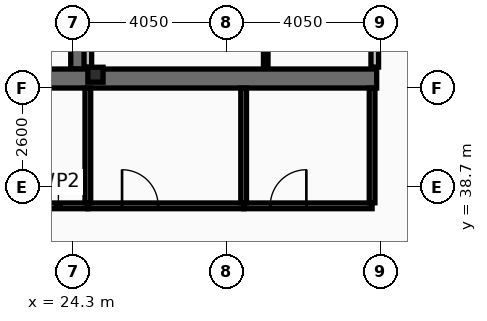
"""IFC4 building model, lengths in metres.
Left out: names, types, materials, properties, quantities, classifications, styles, units other than length and angle.
Written with IfcOpenShell. Run it as: python <this file> out.ifc"""

import sys

from ifc_helpers import new_model, si_unit, direction, frame, frame_2d, origin, origin_2d, place, context, subcontext, project, spatial, rectangle, i_section, extrude, element, fill, save


model = new_model("IFC4")
c1 = context("Model", 3, precision=1e-05, world=origin(), true_north=direction((0.0, 1.0)))
c2 = subcontext(c1, "Body", "Model", "MODEL_VIEW")
j1 = project(units=[si_unit("LENGTHUNIT", "METRE"), si_unit("PLANEANGLEUNIT", "RADIAN")], contexts=[c1])
p1 = place(None, origin())
s1 = spatial("IfcSite", under=j1, at=p1, CompositionType="ELEMENT")
p2 = place(p1, origin())
s2 = spatial("IfcBuilding", under=s1, at=p2, CompositionType="ELEMENT")
p3 = place(p2, frame((0.0, 0.0, 295.0)))
s3 = spatial("IfcBuildingStorey", under=s2, at=p3, CompositionType="ELEMENT", Elevation=295.0)
p4 = place(p3, frame((24.45, 41.8, 0.0), z_axis=(0.0, 0.0, 1.0), x_axis=(0.0, 1.0, 0.0)))
e1 = element("IfcWall", 1, at=p4, inside=s3, PredefinedType="SHEAR", context=c2, shape_type="SweptSolid", body=[
    extrude(rectangle(XDim=11.4, YDim=0.4, at=frame_2d((5.7, 0.0))), origin(), (0.0, 0.0, 1.0), 3.44),
])
p5 = place(p3, frame((32.3, 41.55, 0.0), z_axis=(0.0, 0.0, 1.0), x_axis=(-1.0, 0.0, 0.0)))
e2 = element("IfcWall", 2, at=p5, inside=s3, PredefinedType="SHEAR", context=c2, shape_type="SweptSolid", body=[
    extrude(rectangle(XDim=11.45, YDim=0.5, at=frame_2d((5.725, 0.0))), origin(), (0.0, 0.0, 1.0), 3.44),
])
p6 = place(p3, frame((24.9, 41.65, 0.0), z_axis=(0.0, 0.0, 1.0), x_axis=(1.0, 0.0, 0.0)))
e3 = element("IfcColumn", 3, at=p6, inside=s3, PredefinedType="COLUMN", context=c2, shape_type="SweptSolid", body=[
    extrude(i_section(OverallWidth=0.399, OverallDepth=0.393, WebThickness=0.023, FlangeThickness=0.037, at=origin_2d()), origin(), (0.0, 0.0, 1.0), 3.6),
])
for number, where, z_axis, x_axis in (
    (4, (24.7, 41.85, 0.0), (0.0, 0.0, 1.0), (0.0, 1.0, 0.0)),
    (5, (32.25, 41.85, 0.0), (0.0, 0.0, 1.0), (0.0, 1.0, 0.0)),
):
    element("IfcWall", number, at=place(p3, frame(where, z_axis=z_axis, x_axis=x_axis)), inside=s3, PredefinedType="PARTITIONING", context=c2, shape_type="SweptSolid", body=[
        extrude(rectangle(XDim=2.395, YDim=0.2, at=frame_2d((1.198, 0.0))), origin(), (0.0, 0.0, 1.0), 3.44),
    ])
p7 = place(p3, frame((29.381, 41.85, 0.0), z_axis=(0.0, 0.0, 1.0), x_axis=(0.0, 1.0, 0.0)))
e6 = element("IfcWall", 6, at=p7, inside=s3, PredefinedType="PARTITIONING", context=c2, shape_type="SweptSolid", body=[
    extrude(rectangle(XDim=2.395, YDim=0.12, at=frame_2d((1.198, 0.0))), origin(), (0.0, 0.0, 1.0), 3.44),
])
p8 = place(p3, frame((20.95, 38.2, 0.0), z_axis=(0.0, 0.0, 1.0), x_axis=(1.0, 0.0, 0.0)))
e7 = element("IfcWall", 7, at=p8, inside=s3, PredefinedType="PARTITIONING", context=c2, shape_type="SweptSolid", body=[
    extrude(rectangle(XDim=3.75, YDim=0.15, at=frame_2d((1.875, 0.0))), origin(), (0.0, 0.0, 1.0), 2.78),
])
p9 = place(p8, frame((0.9, 0.0, 0.0)))
e8 = element("IfcOpeningElement", 8, at=p9, cuts=e7, PredefinedType="OPENING", context=c2, shape_type="SweptSolid", body=[
    extrude(rectangle(XDim=0.95, YDim=2.05, at=frame_2d((0.475, 1.025))), frame((0.0, 0.085, 0.0), z_axis=(0.0, -1.0, 0.0), x_axis=(1.0, 0.0, 0.0)), (0.0, 0.0, 1.0), 0.17),
])
p10 = place(p3, frame((24.7, 38.2, 0.0), z_axis=(0.0, 0.0, 1.0), x_axis=(1.0, 0.0, 0.0)))
e9 = element("IfcWall", 9, at=p10, inside=s3, PredefinedType="PARTITIONING", context=c2, shape_type="SweptSolid", body=[
    extrude(rectangle(XDim=4.1, YDim=0.15, at=frame_2d((2.05, 0.0))), origin(), (0.0, 0.0, 1.0), 2.78),
])
p11 = place(p10, frame((0.9, 0.0, 0.0)))
e10 = element("IfcOpeningElement", 10, at=p11, cuts=e9, PredefinedType="OPENING", context=c2, shape_type="SweptSolid", body=[
    extrude(rectangle(XDim=0.95, YDim=2.05, at=frame_2d((0.475, 1.025))), frame((0.0, 0.085, 0.0), z_axis=(0.0, -1.0, 0.0), x_axis=(1.0, 0.0, 0.0)), (0.0, 0.0, 1.0), 0.17),
])
p12 = place(p3, frame((28.8, 38.2, 0.0), z_axis=(0.0, 0.0, 1.0), x_axis=(1.0, 0.0, 0.0)))
e11 = element("IfcWall", 11, at=p12, inside=s3, PredefinedType="PARTITIONING", context=c2, shape_type="SweptSolid", body=[
    extrude(rectangle(XDim=3.38, YDim=0.15, at=frame_2d((1.69, 0.0))), origin(), (0.0, 0.0, 1.0), 2.78),
])
p13 = place(p12, frame((0.7, 0.0, 0.0)))
e12 = element("IfcOpeningElement", 12, at=p13, cuts=e11, PredefinedType="OPENING", context=c2, shape_type="SweptSolid", body=[
    extrude(rectangle(XDim=0.95, YDim=2.05, at=frame_2d((0.475, 1.025))), frame((0.0, 0.085, 0.0), z_axis=(0.0, -1.0, 0.0), x_axis=(1.0, 0.0, 0.0)), (0.0, 0.0, 1.0), 0.17),
])
p14 = place(p3, frame((24.7, 38.28, 0.0), z_axis=(0.0, 0.0, 1.0), x_axis=(0.0, 1.0, 0.0)))
e13 = element("IfcWall", 13, at=p14, inside=s3, PredefinedType="PARTITIONING", context=c2, shape_type="SweptSolid", body=[
    extrude(rectangle(XDim=3.02, YDim=0.15, at=frame_2d((1.51, 0.0))), origin(), (0.0, 0.0, 1.0), 2.78),
])
for number, where, z_axis, x_axis in (
    (14, (28.8, 38.28, 0.0), (0.0, 0.0, 1.0), (0.0, 1.0, 0.0)),
    (15, (32.18, 38.28, 0.0), (0.0, 0.0, 1.0), (0.0, 1.0, 0.0)),
):
    element("IfcWall", number, at=place(p3, frame(where, z_axis=z_axis, x_axis=x_axis)), inside=s3, PredefinedType="PARTITIONING", context=c2, shape_type="SweptSolid", body=[
        extrude(rectangle(XDim=3.02, YDim=0.15, at=frame_2d((1.51, 0.0))), origin(), (0.0, 0.0, 1.0), 3.44),
    ])
p15 = place(p11, origin())
e16 = element("IfcDoor", 16, at=p15, inside=s3, OperationType="SINGLE_SWING_LEFT", PredefinedType="DOOR", context=c2, shape_type="SweptSolid", body=[
    extrude(rectangle(XDim=0.95, YDim=2.05, at=frame_2d((0.475, 1.025))), frame((0.0, 0.025, 0.0), z_axis=(0.0, -1.0, 0.0), x_axis=(1.0, 0.0, 0.0)), (0.0, 0.0, 1.0), 0.05),
])
fill(e10, e16)
p16 = place(p13, origin())
e17 = element("IfcDoor", 17, at=p16, inside=s3, OperationType="SINGLE_SWING_RIGHT", PredefinedType="DOOR", context=c2, shape_type="SweptSolid", body=[
    extrude(rectangle(XDim=0.95, YDim=2.05, at=frame_2d((0.475, 1.025))), frame((0.0, 0.025, 0.0), z_axis=(0.0, -1.0, 0.0), x_axis=(1.0, 0.0, 0.0)), (0.0, 0.0, 1.0), 0.05),
])
fill(e12, e17)
save(model, sys.argv[1])
